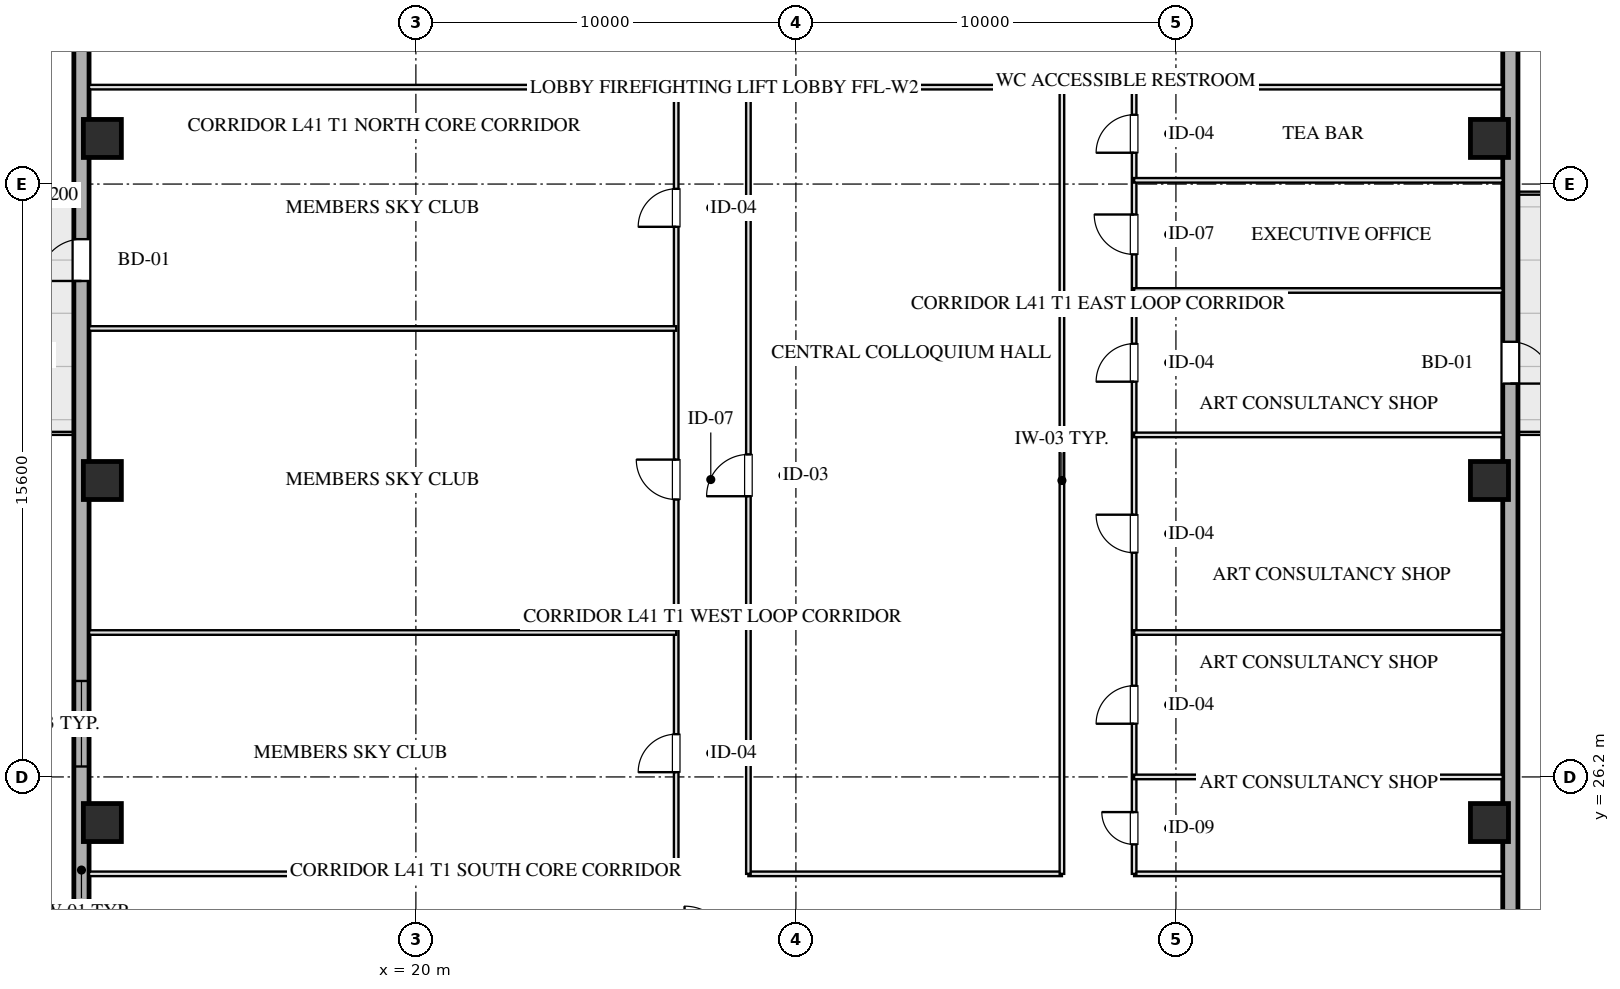
"""IFC4 building model, lengths in metres.
Left out: names, types, materials, properties, quantities, classifications, styles, units other than length and angle.
Written with IfcOpenShell. Run it as: python <this file> out.ifc"""

import sys

from ifc_helpers import new_model, si_unit, direction, frame, frame_2d, origin, origin_2d, place, context, subcontext, project, spatial, rectangle, hollow_rectangle, extrude, element, fill, save


model = new_model("IFC4")
c1 = context("Model", 3, precision=1e-05, world=origin(), true_north=direction((0.0, 1.0)))
c2 = subcontext(c1, "Body", "Model", "MODEL_VIEW")
j1 = project(units=[si_unit("LENGTHUNIT", "METRE"), si_unit("PLANEANGLEUNIT", "RADIAN")], contexts=[c1])
p1 = place(None, origin())
s1 = spatial("IfcSite", under=j1, at=p1, CompositionType="ELEMENT")
p2 = place(p1, origin())
s2 = spatial("IfcBuilding", under=s1, at=p2, CompositionType="ELEMENT")
p3 = place(p2, frame((0.0, 0.0, 156.4)))
s3 = spatial("IfcBuildingStorey", under=s2, at=p3, CompositionType="ELEMENT", Elevation=156.4)
for number, where, z_axis, x_axis in (
    (1, (11.75, 25.0, 0.0), (0.0, 0.0, 1.0), (1.0, 0.0, 0.0)),
    (2, (11.75, 34.0, 0.0), (0.0, 0.0, 1.0), (1.0, 0.0, 0.0)),
    (3, (11.75, 43.0, 0.0), (0.0, 0.0, 1.0), (1.0, 0.0, 0.0)),
    (4, (48.25, 25.0, 0.0), (0.0, 0.0, 1.0), (1.0, 0.0, 0.0)),
    (5, (48.25, 34.0, 0.0), (0.0, 0.0, 1.0), (1.0, 0.0, 0.0)),
    (6, (48.25, 43.0, 0.0), (0.0, 0.0, 1.0), (1.0, 0.0, 0.0)),
):
    element("IfcColumn", number, at=place(p3, frame(where, z_axis=z_axis, x_axis=x_axis)), inside=s3, PredefinedType="COLUMN", context=c2, shape_type="SweptSolid", body=[
        extrude(hollow_rectangle(XDim=1.0, YDim=1.0, WallThickness=0.036, at=origin_2d()), origin(), (0.0, 0.0, 1.0), 3.451),
    ])
p4 = place(p3, frame((11.2, 9.0, 0.0), z_axis=(0.0, 0.0, 1.0), x_axis=(0.0, 1.0, 0.0)))
e7 = element("IfcWall", 7, at=p4, inside=s3, PredefinedType="SOLIDWALL", context=c2, shape_type="SweptSolid", body=[
    extrude(rectangle(XDim=50.0, YDim=0.4, at=frame_2d((25.0, 0.0))), origin(), (0.0, 0.0, 1.0), 2.61),
])
p5 = place(p4, frame((17.475, 0.0, 0.75)))
e8 = element("IfcOpeningElement", 8, at=p5, cuts=e7, PredefinedType="OPENING", context=c2, shape_type="SweptSolid", body=[
    extrude(rectangle(XDim=2.25, YDim=1.46, at=frame_2d((1.125, 0.73))), frame((0.0, 0.21, 0.0), z_axis=(0.0, -1.0, 0.0), x_axis=(1.0, 0.0, 0.0)), (0.0, 0.0, 1.0), 0.42),
])
p6 = place(p4, frame((30.25, 0.0, 0.0)))
e9 = element("IfcOpeningElement", 9, at=p6, cuts=e7, PredefinedType="OPENING", context=c2, shape_type="SweptSolid", body=[
    extrude(rectangle(XDim=1.1, YDim=2.15, at=frame_2d((0.55, 1.075))), frame((0.0, 0.21, 0.0), z_axis=(0.0, -1.0, 0.0), x_axis=(1.0, 0.0, 0.0)), (0.0, 0.0, 1.0), 0.42),
])
p7 = place(p3, frame((48.8, 59.0, 0.0), z_axis=(0.0, 0.0, 1.0), x_axis=(0.0, -1.0, 0.0)))
e10 = element("IfcWall", 10, at=p7, inside=s3, PredefinedType="SOLIDWALL", context=c2, shape_type="SweptSolid", body=[
    extrude(rectangle(XDim=50.0, YDim=0.4, at=frame_2d((25.0, 0.0))), origin(), (0.0, 0.0, 1.0), 2.61),
])
p8 = place(p7, frame((21.35, 0.0, 0.0)))
e11 = element("IfcOpeningElement", 11, at=p8, cuts=e10, PredefinedType="OPENING", context=c2, shape_type="SweptSolid", body=[
    extrude(rectangle(XDim=1.1, YDim=2.15, at=frame_2d((0.55, 1.075))), frame((0.0, 0.21, 0.0), z_axis=(0.0, -1.0, 0.0), x_axis=(1.0, 0.0, 0.0)), (0.0, 0.0, 1.0), 0.42),
])
p9 = place(p3, frame((11.4, 23.65, 0.0), z_axis=(0.0, 0.0, 1.0), x_axis=(1.0, 0.0, 0.0)))
e12 = element("IfcWall", 12, at=p9, inside=s3, PredefinedType="PARTITIONING", context=c2, shape_type="SweptSolid", body=[
    extrude(rectangle(XDim=15.45, YDim=0.12, at=frame_2d((7.725, 0.0))), origin(), (0.0, 0.0, 1.0), 2.15),
])
p10 = place(p3, frame((28.75, 23.65, 0.0), z_axis=(0.0, 0.0, 1.0), x_axis=(1.0, 0.0, 0.0)))
e13 = element("IfcWall", 13, at=p10, inside=s3, PredefinedType="PARTITIONING", context=c2, shape_type="SweptSolid", body=[
    extrude(rectangle(XDim=8.25, YDim=0.12, at=frame_2d((4.125, 0.0))), origin(), (0.0, 0.0, 1.0), 3.175),
])
p11 = place(p3, frame((38.9, 23.65, 0.0), z_axis=(0.0, 0.0, 1.0), x_axis=(1.0, 0.0, 0.0)))
e14 = element("IfcWall", 14, at=p11, inside=s3, PredefinedType="PARTITIONING", context=c2, shape_type="SweptSolid", body=[
    extrude(rectangle(XDim=9.7, YDim=0.12, at=frame_2d((4.85, 0.0))), origin(), (0.0, 0.0, 1.0), 2.15),
])
p12 = place(p3, frame((11.4, 44.35, 0.0), z_axis=(0.0, 0.0, 1.0), x_axis=(1.0, 0.0, 0.0)))
e15 = element("IfcWall", 15, at=p12, inside=s3, PredefinedType="PARTITIONING", context=c2, shape_type="SweptSolid", body=[
    extrude(rectangle(XDim=15.45, YDim=0.12, at=frame_2d((7.725, 0.0))), origin(), (0.0, 0.0, 1.0), 2.15),
])
p13 = place(p3, frame((28.75, 44.35, 0.0), z_axis=(0.0, 0.0, 1.0), x_axis=(1.0, 0.0, 0.0)))
e16 = element("IfcWall", 16, at=p13, inside=s3, PredefinedType="PARTITIONING", context=c2, shape_type="SweptSolid", body=[
    extrude(rectangle(XDim=8.25, YDim=0.12, at=frame_2d((4.125, 0.0))), origin(), (0.0, 0.0, 1.0), 3.175),
])
p14 = place(p3, frame((38.9, 44.35, 0.0), z_axis=(0.0, 0.0, 1.0), x_axis=(1.0, 0.0, 0.0)))
e17 = element("IfcWall", 17, at=p14, inside=s3, PredefinedType="PARTITIONING", context=c2, shape_type="SweptSolid", body=[
    extrude(rectangle(XDim=9.7, YDim=0.12, at=frame_2d((4.85, 0.0))), origin(), (0.0, 0.0, 1.0), 2.15),
])
p15 = place(p3, frame((26.85, 23.65, 0.0), z_axis=(0.0, 0.0, 1.0), x_axis=(0.0, 1.0, 0.0)))
e18 = element("IfcWall", 18, at=p15, inside=s3, PredefinedType="PARTITIONING", context=c2, shape_type="SweptSolid", body=[
    extrude(rectangle(XDim=20.7, YDim=0.12, at=frame_2d((10.35, 0.0))), origin(), (0.0, 0.0, 1.0), 3.175),
])
p16 = place(p15, frame((2.675, 0.0, 0.0)))
e19 = element("IfcOpeningElement", 19, at=p16, cuts=e18, PredefinedType="OPENING", context=c2, shape_type="SweptSolid", body=[
    extrude(rectangle(XDim=1.0, YDim=2.05, at=frame_2d((0.5, 1.025))), frame((0.0, 0.07, 0.0), z_axis=(0.0, -1.0, 0.0), x_axis=(1.0, 0.0, 0.0)), (0.0, 0.0, 1.0), 0.14),
])
p17 = place(p15, frame((9.85, 0.0, 0.0)))
e20 = element("IfcOpeningElement", 20, at=p17, cuts=e18, PredefinedType="OPENING", context=c2, shape_type="SweptSolid", body=[
    extrude(rectangle(XDim=1.05, YDim=2.05, at=frame_2d((0.525, 1.025))), frame((0.0, 0.07, 0.0), z_axis=(0.0, -1.0, 0.0), x_axis=(1.0, 0.0, 0.0)), (0.0, 0.0, 1.0), 0.14),
])
p18 = place(p15, frame((17.025, 0.0, 0.0)))
e21 = element("IfcOpeningElement", 21, at=p18, cuts=e18, PredefinedType="OPENING", context=c2, shape_type="SweptSolid", body=[
    extrude(rectangle(XDim=1.0, YDim=2.05, at=frame_2d((0.5, 1.025))), frame((0.0, 0.07, 0.0), z_axis=(0.0, -1.0, 0.0), x_axis=(1.0, 0.0, 0.0)), (0.0, 0.0, 1.0), 0.14),
])
p19 = place(p3, frame((28.75, 23.65, 0.0), z_axis=(0.0, 0.0, 1.0), x_axis=(0.0, 1.0, 0.0)))
e22 = element("IfcWall", 22, at=p19, inside=s3, PredefinedType="PARTITIONING", context=c2, shape_type="SweptSolid", body=[
    extrude(rectangle(XDim=20.7, YDim=0.12, at=frame_2d((10.35, 0.0))), origin(), (0.0, 0.0, 1.0), 3.175),
])
p20 = place(p19, frame((9.936, 0.0, 0.0)))
e23 = element("IfcOpeningElement", 23, at=p20, cuts=e22, PredefinedType="OPENING", context=c2, shape_type="SweptSolid", body=[
    extrude(rectangle(XDim=1.1, YDim=2.05, at=frame_2d((0.55, 1.025))), frame((0.0, 0.07, 0.0), z_axis=(0.0, -1.0, 0.0), x_axis=(1.0, 0.0, 0.0)), (0.0, 0.0, 1.0), 0.14),
])
p21 = place(p3, frame((37.0, 23.65, 0.0), z_axis=(0.0, 0.0, 1.0), x_axis=(0.0, 1.0, 0.0)))
e24 = element("IfcWall", 24, at=p21, inside=s3, PredefinedType="PARTITIONING", context=c2, shape_type="SweptSolid", body=[
    extrude(rectangle(XDim=20.7, YDim=0.12, at=frame_2d((10.35, 0.0))), origin(), (0.0, 0.0, 1.0), 3.175),
])
p22 = place(p3, frame((38.9, 23.65, 0.0), z_axis=(0.0, 0.0, 1.0), x_axis=(0.0, 1.0, 0.0)))
e25 = element("IfcWall", 25, at=p22, inside=s3, PredefinedType="PARTITIONING", context=c2, shape_type="SweptSolid", body=[
    extrude(rectangle(XDim=20.7, YDim=0.12, at=frame_2d((10.35, 0.0))), origin(), (0.0, 0.0, 1.0), 3.175),
])
p23 = place(p22, frame((0.775, 0.0, 0.0)))
e26 = element("IfcOpeningElement", 26, at=p23, cuts=e25, PredefinedType="OPENING", context=c2, shape_type="SweptSolid", body=[
    extrude(rectangle(XDim=0.85, YDim=2.05, at=frame_2d((0.425, 1.025))), frame((0.0, 0.07, 0.0), z_axis=(0.0, -1.0, 0.0), x_axis=(1.0, 0.0, 0.0)), (0.0, 0.0, 1.0), 0.14),
])
p24 = place(p22, frame((3.95, 0.0, 0.0)))
e27 = element("IfcOpeningElement", 27, at=p24, cuts=e25, PredefinedType="OPENING", context=c2, shape_type="SweptSolid", body=[
    extrude(rectangle(XDim=1.0, YDim=2.05, at=frame_2d((0.5, 1.025))), frame((0.0, 0.07, 0.0), z_axis=(0.0, -1.0, 0.0), x_axis=(1.0, 0.0, 0.0)), (0.0, 0.0, 1.0), 0.14),
])
p25 = place(p22, frame((8.45, 0.0, 0.0)))
e28 = element("IfcOpeningElement", 28, at=p25, cuts=e25, PredefinedType="OPENING", context=c2, shape_type="SweptSolid", body=[
    extrude(rectangle(XDim=1.0, YDim=2.05, at=frame_2d((0.5, 1.025))), frame((0.0, 0.07, 0.0), z_axis=(0.0, -1.0, 0.0), x_axis=(1.0, 0.0, 0.0)), (0.0, 0.0, 1.0), 0.14),
])
p26 = place(p22, frame((12.95, 0.0, 0.0)))
e29 = element("IfcOpeningElement", 29, at=p26, cuts=e25, PredefinedType="OPENING", context=c2, shape_type="SweptSolid", body=[
    extrude(rectangle(XDim=1.0, YDim=2.05, at=frame_2d((0.5, 1.025))), frame((0.0, 0.07, 0.0), z_axis=(0.0, -1.0, 0.0), x_axis=(1.0, 0.0, 0.0)), (0.0, 0.0, 1.0), 0.14),
])
p27 = place(p22, frame((16.299, 0.0, 0.0)))
e30 = element("IfcOpeningElement", 30, at=p27, cuts=e25, PredefinedType="OPENING", context=c2, shape_type="SweptSolid", body=[
    extrude(rectangle(XDim=1.05, YDim=2.05, at=frame_2d((0.525, 1.025))), frame((0.0, 0.07, 0.0), z_axis=(0.0, -1.0, 0.0), x_axis=(1.0, 0.0, 0.0)), (0.0, 0.0, 1.0), 0.14),
])
p28 = place(p22, frame((18.974, 0.0, 0.0)))
e31 = element("IfcOpeningElement", 31, at=p28, cuts=e25, PredefinedType="OPENING", context=c2, shape_type="SweptSolid", body=[
    extrude(rectangle(XDim=1.0, YDim=2.05, at=frame_2d((0.5, 1.025))), frame((0.0, 0.07, 0.0), z_axis=(0.0, -1.0, 0.0), x_axis=(1.0, 0.0, 0.0)), (0.0, 0.0, 1.0), 0.14),
])
for number, where, z_axis, x_axis in (
    (32, (11.4, 30.0, 0.0), (0.0, 0.0, 1.0), (1.0, 0.0, 0.0)),
    (33, (11.4, 38.0, 0.0), (0.0, 0.0, 1.0), (1.0, 0.0, 0.0)),
):
    element("IfcWall", number, at=place(p3, frame(where, z_axis=z_axis, x_axis=x_axis)), inside=s3, PredefinedType="PARTITIONING", context=c2, shape_type="SweptSolid", body=[
        extrude(rectangle(XDim=15.45, YDim=0.12, at=frame_2d((7.725, 0.0))), origin(), (0.0, 0.0, 1.0), 3.175),
    ])
for number, where, z_axis, x_axis in (
    (34, (38.9, 26.2, 0.0), (0.0, 0.0, 1.0), (1.0, 0.0, 0.0)),
    (35, (38.9, 30.0, 0.0), (0.0, 0.0, 1.0), (1.0, 0.0, 0.0)),
    (36, (38.9, 35.2, 0.0), (0.0, 0.0, 1.0), (1.0, 0.0, 0.0)),
    (37, (38.9, 39.0, 0.0), (0.0, 0.0, 1.0), (1.0, 0.0, 0.0)),
    (38, (38.9, 41.898, 0.0), (0.0, 0.0, 1.0), (1.0, 0.0, 0.0)),
):
    element("IfcWall", number, at=place(p3, frame(where, z_axis=z_axis, x_axis=x_axis)), inside=s3, PredefinedType="PARTITIONING", context=c2, shape_type="SweptSolid", body=[
        extrude(rectangle(XDim=9.7, YDim=0.12, at=frame_2d((4.85, 0.0))), origin(), (0.0, 0.0, 1.0), 3.175),
    ])
p29 = place(p5, origin())
e39 = element("IfcWindow", 39, at=p29, inside=s3, PartitioningType="TRIPLE_PANEL_VERTICAL", PredefinedType="WINDOW", context=c2, shape_type="SweptSolid", body=[
    extrude(rectangle(XDim=2.25, YDim=1.46, at=frame_2d((1.125, 0.73))), frame((0.0, 0.03, 0.0), z_axis=(0.0, -1.0, 0.0), x_axis=(1.0, 0.0, 0.0)), (0.0, 0.0, 1.0), 0.06),
])
fill(e8, e39)
p30 = place(p6, origin())
e40 = element("IfcDoor", 40, at=p30, inside=s3, OperationType="SINGLE_SWING_LEFT", PredefinedType="DOOR", context=c2, shape_type="SweptSolid", body=[
    extrude(rectangle(XDim=1.1, YDim=2.15, at=frame_2d((0.55, 1.075))), frame((0.0, 0.025, 0.0), z_axis=(0.0, -1.0, 0.0), x_axis=(1.0, 0.0, 0.0)), (0.0, 0.0, 1.0), 0.05),
])
fill(e9, e40)
p31 = place(p8, origin())
e41 = element("IfcDoor", 41, at=p31, inside=s3, OperationType="SINGLE_SWING_RIGHT", PredefinedType="DOOR", context=c2, shape_type="SweptSolid", body=[
    extrude(rectangle(XDim=1.1, YDim=2.15, at=frame_2d((0.55, 1.075))), frame((0.0, 0.025, 0.0), z_axis=(0.0, -1.0, 0.0), x_axis=(1.0, 0.0, 0.0)), (0.0, 0.0, 1.0), 0.05),
])
fill(e11, e41)
p32 = place(p16, origin())
e42 = element("IfcDoor", 42, at=p32, inside=s3, OperationType="SINGLE_SWING_LEFT", PredefinedType="DOOR", context=c2, shape_type="SweptSolid", body=[
    extrude(rectangle(XDim=1.0, YDim=2.05, at=frame_2d((0.5, 1.025))), frame((0.0, 0.025, 0.0), z_axis=(0.0, -1.0, 0.0), x_axis=(1.0, 0.0, 0.0)), (0.0, 0.0, 1.0), 0.05),
])
fill(e19, e42)
p33 = place(p17, origin())
e43 = element("IfcDoor", 43, at=p33, inside=s3, OperationType="SINGLE_SWING_RIGHT", PredefinedType="DOOR", context=c2, shape_type="SweptSolid", body=[
    extrude(rectangle(XDim=1.05, YDim=2.05, at=frame_2d((0.525, 1.025))), frame((0.0, 0.025, 0.0), z_axis=(0.0, -1.0, 0.0), x_axis=(1.0, 0.0, 0.0)), (0.0, 0.0, 1.0), 0.05),
])
fill(e20, e43)
p34 = place(p18, origin())
e44 = element("IfcDoor", 44, at=p34, inside=s3, OperationType="SINGLE_SWING_LEFT", PredefinedType="DOOR", context=c2, shape_type="SweptSolid", body=[
    extrude(rectangle(XDim=1.0, YDim=2.05, at=frame_2d((0.5, 1.025))), frame((0.0, 0.025, 0.0), z_axis=(0.0, -1.0, 0.0), x_axis=(1.0, 0.0, 0.0)), (0.0, 0.0, 1.0), 0.05),
])
fill(e21, e44)
p35 = place(p20, origin())
e45 = element("IfcDoor", 45, at=p35, inside=s3, OperationType="SINGLE_SWING_LEFT", PredefinedType="DOOR", context=c2, shape_type="SweptSolid", body=[
    extrude(rectangle(XDim=1.1, YDim=2.05, at=frame_2d((0.55, 1.025))), frame((0.0, 0.025, 0.0), z_axis=(0.0, -1.0, 0.0), x_axis=(1.0, 0.0, 0.0)), (0.0, 0.0, 1.0), 0.05),
])
fill(e23, e45)
p36 = place(p23, origin())
e46 = element("IfcDoor", 46, at=p36, inside=s3, OperationType="SINGLE_SWING_RIGHT", PredefinedType="DOOR", context=c2, shape_type="SweptSolid", body=[
    extrude(rectangle(XDim=0.85, YDim=2.05, at=frame_2d((0.425, 1.025))), frame((0.0, 0.025, 0.0), z_axis=(0.0, -1.0, 0.0), x_axis=(1.0, 0.0, 0.0)), (0.0, 0.0, 1.0), 0.05),
])
fill(e26, e46)
p37 = place(p24, origin())
e47 = element("IfcDoor", 47, at=p37, inside=s3, OperationType="SINGLE_SWING_LEFT", PredefinedType="DOOR", context=c2, shape_type="SweptSolid", body=[
    extrude(rectangle(XDim=1.0, YDim=2.05, at=frame_2d((0.5, 1.025))), frame((0.0, 0.025, 0.0), z_axis=(0.0, -1.0, 0.0), x_axis=(1.0, 0.0, 0.0)), (0.0, 0.0, 1.0), 0.05),
])
fill(e27, e47)
p38 = place(p25, origin())
e48 = element("IfcDoor", 48, at=p38, inside=s3, OperationType="SINGLE_SWING_RIGHT", PredefinedType="DOOR", context=c2, shape_type="SweptSolid", body=[
    extrude(rectangle(XDim=1.0, YDim=2.05, at=frame_2d((0.5, 1.025))), frame((0.0, 0.025, 0.0), z_axis=(0.0, -1.0, 0.0), x_axis=(1.0, 0.0, 0.0)), (0.0, 0.0, 1.0), 0.05),
])
fill(e28, e48)
p39 = place(p26, origin())
e49 = element("IfcDoor", 49, at=p39, inside=s3, OperationType="SINGLE_SWING_LEFT", PredefinedType="DOOR", context=c2, shape_type="SweptSolid", body=[
    extrude(rectangle(XDim=1.0, YDim=2.05, at=frame_2d((0.5, 1.025))), frame((0.0, 0.025, 0.0), z_axis=(0.0, -1.0, 0.0), x_axis=(1.0, 0.0, 0.0)), (0.0, 0.0, 1.0), 0.05),
])
fill(e29, e49)
p40 = place(p27, origin())
e50 = element("IfcDoor", 50, at=p40, inside=s3, OperationType="SINGLE_SWING_RIGHT", PredefinedType="DOOR", context=c2, shape_type="SweptSolid", body=[
    extrude(rectangle(XDim=1.05, YDim=2.05, at=frame_2d((0.525, 1.025))), frame((0.0, 0.025, 0.0), z_axis=(0.0, -1.0, 0.0), x_axis=(1.0, 0.0, 0.0)), (0.0, 0.0, 1.0), 0.05),
])
fill(e30, e50)
p41 = place(p28, origin())
e51 = element("IfcDoor", 51, at=p41, inside=s3, OperationType="SINGLE_SWING_LEFT", PredefinedType="DOOR", context=c2, shape_type="SweptSolid", body=[
    extrude(rectangle(XDim=1.0, YDim=2.05, at=frame_2d((0.5, 1.025))), frame((0.0, 0.025, 0.0), z_axis=(0.0, -1.0, 0.0), x_axis=(1.0, 0.0, 0.0)), (0.0, 0.0, 1.0), 0.05),
])
fill(e31, e51)
save(model, sys.argv[1])
